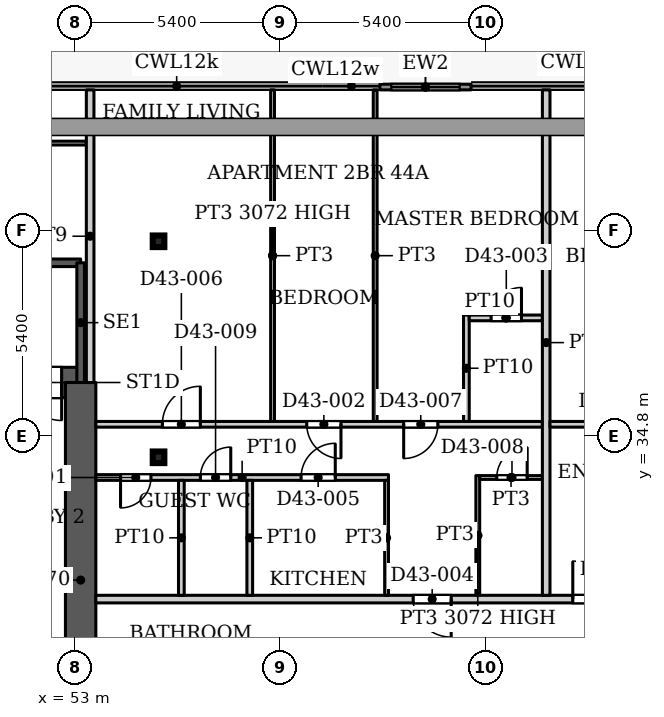
"""IFC4 building model, lengths in metres.
Left out: names, types, materials, properties, quantities, classifications, styles, units other than length and angle.
Written with IfcOpenShell. Run it as: python <this file> out.ifc"""

import sys

from ifc_helpers import new_model, si_unit, direction, frame, frame_2d, origin, origin_2d, place, context, subcontext, project, spatial, rectangle, hollow_rectangle, extrude, source, transform, mapped, element, fill, save


model = new_model("IFC4")
c1 = context("Model", 3, precision=1e-05, world=origin(), true_north=direction((0.0, 1.0)))
c2 = subcontext(c1, "Body", "Model", "MODEL_VIEW")
j1 = project(units=[si_unit("LENGTHUNIT", "METRE"), si_unit("PLANEANGLEUNIT", "RADIAN")], contexts=[c1])
p1 = place(None, origin())
s1 = spatial("IfcSite", under=j1, at=p1, CompositionType="ELEMENT")
p2 = place(p1, origin())
s2 = spatial("IfcBuilding", under=s1, at=p2, CompositionType="ELEMENT")
p3 = place(p2, frame((0.0, 0.0, 187.7)))
s3 = spatial("IfcBuildingStorey", under=s2, at=p3, CompositionType="ELEMENT", Elevation=187.7)
for number, where, z_axis, x_axis in (
    (1, (55.2, 34.232, 0.0), (0.0, 0.0, 1.0), (1.0, 0.0, 0.0)),
    (2, (55.2, 39.916, 0.0), (0.0, 0.0, 1.0), (1.0, 0.0, 0.0)),
):
    element("IfcColumn", number, at=place(p3, frame(where, z_axis=z_axis, x_axis=x_axis)), inside=s3, PredefinedType="COLUMN", context=c2, shape_type="SweptSolid", body=[
        extrude(hollow_rectangle(XDim=0.305, YDim=0.305, WallThickness=0.016, InnerFilletRadius=0.016, OuterFilletRadius=0.032, at=origin_2d()), origin(), (0.0, 0.0, 1.0), 3.9),
    ])
p4 = place(p3, frame((34.75, 36.2, 0.0), z_axis=(0.0, 0.0, 1.0), x_axis=(1.0, 0.0, 0.0)))
e3 = element("IfcWall", 3, at=p4, inside=s3, PredefinedType="SHEAR", context=c2, shape_type="SweptSolid", body=[
    extrude(rectangle(XDim=18.4, YDim=0.8, at=frame_2d((9.2, 0.0))), origin(), (0.0, 0.0, 1.0), 3.9),
])
p5 = place(p4, frame((16.9, 0.0, 0.0)))
e4 = element("IfcOpeningElement", 4, at=p5, cuts=e3, PredefinedType="OPENING", context=c2, shape_type="SweptSolid", body=[
    extrude(rectangle(XDim=1.0, YDim=2.2, at=frame_2d((0.5, 1.1))), frame((0.0, 0.41, 0.0), z_axis=(0.0, -1.0, 0.0), x_axis=(1.0, 0.0, 0.0)), (0.0, 0.0, 1.0), 0.82),
])
p6 = place(p3, frame((53.15, 25.8, 0.0), z_axis=(0.0, 0.0, 1.0), x_axis=(0.0, 1.0, 0.0)))
e5 = element("IfcWall", 5, at=p6, inside=s3, PredefinedType="SHEAR", context=c2, shape_type="SweptSolid", body=[
    extrude(rectangle(XDim=10.4, YDim=0.8, at=frame_2d((5.2, 0.0))), origin(), (0.0, 0.0, 1.0), 3.9),
])
p7 = place(p3, frame((61.024, 43.975, 0.0), z_axis=(0.0, 0.0, 1.0), x_axis=(1.0, 0.0, 0.0)))
e6 = element("IfcWall", 6, at=p7, inside=s3, PredefinedType="SOLIDWALL", context=c2, shape_type="SweptSolid", body=[
    extrude(rectangle(XDim=2.4, YDim=0.15, at=frame_2d((1.2, 0.0))), origin(), (0.0, 0.0, 1.0), 3.75),
])
p8 = place(p7, frame((0.3, 0.0, 0.0)))
e7 = element("IfcOpeningElement", 7, at=p8, cuts=e6, PredefinedType="OPENING", context=c2, shape_type="SweptSolid", body=[
    extrude(rectangle(XDim=1.8, YDim=2.4, at=frame_2d((0.9, 1.2))), frame((0.0, 0.085, 0.0), z_axis=(0.0, -1.0, 0.0), x_axis=(1.0, 0.0, 0.0)), (0.0, 0.0, 1.0), 0.17),
])
p9 = place(p3, frame((43.99, 39.35, 0.0), z_axis=(0.0, 0.0, 1.0), x_axis=(1.0, 0.0, 0.0)))
e8 = element("IfcWall", 8, at=p9, inside=s3, PredefinedType="SHEAR", context=c2, shape_type="SweptSolid", body=[
    extrude(rectangle(XDim=9.16, YDim=0.2, at=frame_2d((4.58, 0.0))), origin(), (0.0, 0.0, 1.0), 3.9),
])
p10 = place(p3, frame((53.15, 36.2, 0.0), z_axis=(0.0, 0.0, 1.0), x_axis=(0.0, 1.0, 0.0)))
e9 = element("IfcWall", 9, at=p10, inside=s3, PredefinedType="SHEAR", context=c2, shape_type="SweptSolid", body=[
    extrude(rectangle(XDim=3.15, YDim=0.2, at=frame_2d((1.575, 0.0))), origin(), (0.0, 0.0, 1.0), 3.9),
])
p11 = place(p3, frame((38.399, 42.5, 0.0), z_axis=(0.0, 0.0, 1.0), x_axis=(1.0, 0.0, 0.0)))
e10 = element("IfcWall", 10, at=p11, inside=s3, PredefinedType="PARTITIONING", context=c2, shape_type="SweptSolid", body=[
    extrude(rectangle(XDim=14.901, YDim=0.1, at=frame_2d((7.451, 0.0))), origin(), (0.0, 0.0, 1.0), 3.6),
])
p12 = place(p11, frame((6.801, 0.0, 0.0)))
e11 = element("IfcOpeningElement", 11, at=p12, cuts=e10, PredefinedType="OPENING", context=c2, shape_type="SweptSolid", body=[
    extrude(rectangle(XDim=1.0, YDim=2.1, at=frame_2d((0.5, 1.05))), frame((0.0, 0.06, 0.0), z_axis=(0.0, -1.0, 0.0), x_axis=(1.0, 0.0, 0.0)), (0.0, 0.0, 1.0), 0.12),
])
p13 = place(p3, frame((53.4, 36.199, 0.0), z_axis=(0.0, 0.0, 1.0), x_axis=(0.0, 1.0, 0.0)))
e12 = element("IfcWall", 12, at=p13, inside=s3, PredefinedType="PARTITIONING", context=c2, shape_type="SweptSolid", body=[
    extrude(rectangle(XDim=7.701, YDim=0.2, at=frame_2d((3.851, 0.0))), origin(), (0.0, 0.0, 1.0), 3.6),
])
p14 = place(p3, frame((53.549, 30.5, 0.0), z_axis=(0.0, 0.0, 1.0), x_axis=(1.0, 0.0, 0.0)))
e13 = element("IfcWall", 13, at=p14, inside=s3, PredefinedType="PARTITIONING", context=c2, shape_type="SweptSolid", body=[
    extrude(rectangle(XDim=44.551, YDim=0.2, at=frame_2d((22.275, 0.0))), origin(), (0.0, 0.0, 1.0), 3.6),
])
p15 = place(p14, frame((8.351, 0.0, 0.0)))
e14 = element("IfcOpeningElement", 14, at=p15, cuts=e13, PredefinedType="OPENING", context=c2, shape_type="SweptSolid", body=[
    extrude(rectangle(XDim=1.0, YDim=2.1, at=frame_2d((0.5, 1.05))), frame((0.0, 0.11, 0.0), z_axis=(0.0, -1.0, 0.0), x_axis=(1.0, 0.0, 0.0)), (0.0, 0.0, 1.0), 0.22),
])
p16 = place(p14, frame((12.551, 0.0, 0.0)))
e15 = element("IfcOpeningElement", 15, at=p16, cuts=e13, PredefinedType="OPENING", context=c2, shape_type="SweptSolid", body=[
    extrude(rectangle(XDim=1.0, YDim=2.1, at=frame_2d((0.5, 1.05))), frame((0.0, 0.11, 0.0), z_axis=(0.0, -1.0, 0.0), x_axis=(1.0, 0.0, 0.0)), (0.0, 0.0, 1.0), 0.22),
])
p17 = place(p14, frame((28.751, 0.0, 0.0)))
e16 = element("IfcOpeningElement", 16, at=p17, cuts=e13, PredefinedType="OPENING", context=c2, shape_type="SweptSolid", body=[
    extrude(rectangle(XDim=1.0, YDim=2.1, at=frame_2d((0.5, 1.05))), frame((0.0, 0.11, 0.0), z_axis=(0.0, -1.0, 0.0), x_axis=(1.0, 0.0, 0.0)), (0.0, 0.0, 1.0), 0.22),
])
p18 = place(p14, frame((40.751, 0.0, 0.0)))
e17 = element("IfcOpeningElement", 17, at=p18, cuts=e13, PredefinedType="OPENING", context=c2, shape_type="SweptSolid", body=[
    extrude(rectangle(XDim=1.0, YDim=2.1, at=frame_2d((0.5, 1.05))), frame((0.0, 0.11, 0.0), z_axis=(0.0, -1.0, 0.0), x_axis=(1.0, 0.0, 0.0)), (0.0, 0.0, 1.0), 0.22),
])
p19 = place(p3, frame((53.549, 33.7, 0.0), z_axis=(0.0, 0.0, 1.0), x_axis=(1.0, 0.0, 0.0)))
e18 = element("IfcWall", 18, at=p19, inside=s3, PredefinedType="PARTITIONING", context=c2, shape_type="SweptSolid", body=[
    extrude(rectangle(XDim=7.701, YDim=0.15, at=frame_2d((3.851, 0.0))), origin(), (0.0, 0.0, 1.0), 3.6),
])
p20 = place(p19, frame((0.651, 0.0, 0.0)))
e19 = element("IfcOpeningElement", 19, at=p20, cuts=e18, PredefinedType="OPENING", context=c2, shape_type="SweptSolid", body=[
    extrude(rectangle(XDim=0.8, YDim=2.1, at=frame_2d((0.4, 1.05))), frame((0.0, 0.085, 0.0), z_axis=(0.0, -1.0, 0.0), x_axis=(1.0, 0.0, 0.0)), (0.0, 0.0, 1.0), 0.17),
])
p21 = place(p19, frame((5.401, 0.0, 0.0)))
e20 = element("IfcOpeningElement", 20, at=p21, cuts=e18, PredefinedType="OPENING", context=c2, shape_type="SweptSolid", body=[
    extrude(rectangle(XDim=0.9, YDim=2.1, at=frame_2d((0.45, 1.05))), frame((0.0, 0.085, 0.0), z_axis=(0.0, -1.0, 0.0), x_axis=(1.0, 0.0, 0.0)), (0.0, 0.0, 1.0), 0.17),
])
p22 = place(p19, frame((2.751, 0.0, 0.0)))
e21 = element("IfcOpeningElement", 21, at=p22, cuts=e18, PredefinedType="OPENING", context=c2, shape_type="SweptSolid", body=[
    extrude(rectangle(XDim=0.8, YDim=2.1, at=frame_2d((0.4, 1.05))), frame((0.0, 0.085, 0.0), z_axis=(0.0, -1.0, 0.0), x_axis=(1.0, 0.0, 0.0)), (0.0, 0.0, 1.0), 0.17),
])
p23 = place(p3, frame((53.549, 35.1, 0.0), z_axis=(0.0, 0.0, 1.0), x_axis=(1.0, 0.0, 0.0)))
e22 = element("IfcWall", 22, at=p23, inside=s3, PredefinedType="PARTITIONING", context=c2, shape_type="SweptSolid", body=[
    extrude(rectangle(XDim=11.751, YDim=0.15, at=frame_2d((5.875, 0.0))), origin(), (0.0, 0.0, 1.0), 3.6),
])
p24 = place(p23, frame((5.551, 0.0, 0.0)))
e23 = element("IfcOpeningElement", 23, at=p24, cuts=e22, PredefinedType="OPENING", context=c2, shape_type="SweptSolid", body=[
    extrude(rectangle(XDim=0.9, YDim=2.1, at=frame_2d((0.45, 1.05))), frame((0.0, 0.085, 0.0), z_axis=(0.0, -1.0, 0.0), x_axis=(1.0, 0.0, 0.0)), (0.0, 0.0, 1.0), 0.17),
])
p25 = place(p23, frame((1.751, 0.0, 0.0)))
e24 = element("IfcOpeningElement", 24, at=p25, cuts=e22, PredefinedType="OPENING", context=c2, shape_type="SweptSolid", body=[
    extrude(rectangle(XDim=1.0, YDim=2.1, at=frame_2d((0.5, 1.05))), frame((0.0, 0.085, 0.0), z_axis=(0.0, -1.0, 0.0), x_axis=(1.0, 0.0, 0.0)), (0.0, 0.0, 1.0), 0.17),
])
p26 = place(p23, frame((8.101, 0.0, 0.0)))
e25 = element("IfcOpeningElement", 25, at=p26, cuts=e22, PredefinedType="OPENING", context=c2, shape_type="SweptSolid", body=[
    extrude(rectangle(XDim=0.9, YDim=2.1, at=frame_2d((0.45, 1.05))), frame((0.0, 0.085, 0.0), z_axis=(0.0, -1.0, 0.0), x_axis=(1.0, 0.0, 0.0)), (0.0, 0.0, 1.0), 0.17),
])
for number, where, z_axis, x_axis in (
    (26, (55.8, 30.6, 0.0), (0.0, 0.0, 1.0), (0.0, 1.0, 0.0)),
    (27, (57.6, 30.6, 0.0), (0.0, 0.0, 1.0), (0.0, 1.0, 0.0)),
):
    element("IfcWall", number, at=place(p3, frame(where, z_axis=z_axis, x_axis=x_axis)), inside=s3, PredefinedType="PARTITIONING", context=c2, shape_type="SweptSolid", body=[
        extrude(rectangle(XDim=3.025, YDim=0.15, at=frame_2d((1.512, 0.0))), origin(), (0.0, 0.0, 1.0), 3.6),
    ])
p27 = place(p3, frame((58.2, 35.175, 0.0), z_axis=(0.0, 0.0, 1.0), x_axis=(0.0, 1.0, 0.0)))
e28 = element("IfcWall", 28, at=p27, inside=s3, PredefinedType="PARTITIONING", context=c2, shape_type="SweptSolid", body=[
    extrude(rectangle(XDim=8.725, YDim=0.1, at=frame_2d((4.362, 0.0))), origin(), (0.0, 0.0, 1.0), 3.072),
])
p28 = place(p3, frame((60.9, 35.175, 0.0), z_axis=(0.0, 0.0, 1.0), x_axis=(0.0, 1.0, 0.0)))
e29 = element("IfcWall", 29, at=p28, inside=s3, PredefinedType="PARTITIONING", context=c2, shape_type="SweptSolid", body=[
    extrude(rectangle(XDim=8.725, YDim=0.1, at=frame_2d((4.362, 0.0))), origin(), (0.0, 0.0, 1.0), 3.6),
])
p29 = place(p3, frame((61.2, 30.6, 0.0), z_axis=(0.0, 0.0, 1.0), x_axis=(0.0, 1.0, 0.0)))
e30 = element("IfcWall", 30, at=p29, inside=s3, PredefinedType="PARTITIONING", context=c2, shape_type="SweptSolid", body=[
    extrude(rectangle(XDim=3.025, YDim=0.1, at=frame_2d((1.512, 0.0))), origin(), (0.0, 0.0, 1.0), 3.6),
])
p30 = place(p3, frame((63.3, 35.175, 0.0), z_axis=(0.0, 0.0, 1.0), x_axis=(0.0, 1.0, 0.0)))
e31 = element("IfcWall", 31, at=p30, inside=s3, PredefinedType="PARTITIONING", context=c2, shape_type="SweptSolid", body=[
    extrude(rectangle(XDim=2.8, YDim=0.15, at=frame_2d((1.4, 0.0))), origin(), (0.0, 0.0, 1.0), 3.6),
])
p31 = place(p3, frame((63.375, 37.9, 0.0), z_axis=(0.0, 0.0, 1.0), x_axis=(1.0, 0.0, 0.0)))
e32 = element("IfcWall", 32, at=p31, inside=s3, PredefinedType="PARTITIONING", context=c2, shape_type="SweptSolid", body=[
    extrude(rectangle(XDim=1.925, YDim=0.15, at=frame_2d((0.962, 0.0))), origin(), (0.0, 0.0, 1.0), 3.6),
])
p32 = place(p31, frame((0.575, 0.0, 0.0)))
e33 = element("IfcOpeningElement", 33, at=p32, cuts=e32, PredefinedType="OPENING", context=c2, shape_type="SweptSolid", body=[
    extrude(rectangle(XDim=0.8, YDim=2.1, at=frame_2d((0.4, 1.05))), frame((0.0, 0.085, 0.0), z_axis=(0.0, -1.0, 0.0), x_axis=(1.0, 0.0, 0.0)), (0.0, 0.0, 1.0), 0.17),
])
p33 = place(p3, frame((63.6, 30.6, 0.0), z_axis=(0.0, 0.0, 1.0), x_axis=(0.0, 1.0, 0.0)))
e34 = element("IfcWall", 34, at=p33, inside=s3, PredefinedType="PARTITIONING", context=c2, shape_type="SweptSolid", body=[
    extrude(rectangle(XDim=3.15, YDim=0.1, at=frame_2d((1.575, 0.0))), origin(), (0.0, 0.0, 1.0), 3.072),
])
p34 = place(p3, frame((63.65, 33.7, 0.0), z_axis=(0.0, 0.0, 1.0), x_axis=(1.0, 0.0, 0.0)))
e35 = element("IfcWall", 35, at=p34, inside=s3, PredefinedType="PARTITIONING", context=c2, shape_type="SweptSolid", body=[
    extrude(rectangle(XDim=1.65, YDim=0.1, at=frame_2d((0.825, 0.0))), origin(), (0.0, 0.0, 1.0), 3.6),
])
p35 = place(p34, frame((0.45, 0.0, 0.0)))
e36 = element("IfcOpeningElement", 36, at=p35, cuts=e35, PredefinedType="OPENING", context=c2, shape_type="SweptSolid", body=[
    extrude(rectangle(XDim=0.8, YDim=2.1, at=frame_2d((0.4, 1.05))), frame((0.0, 0.06, 0.0), z_axis=(0.0, -1.0, 0.0), x_axis=(1.0, 0.0, 0.0)), (0.0, 0.0, 1.0), 0.12),
])
p36 = place(p3, frame((65.4, 30.6, 0.0), z_axis=(0.0, 0.0, 1.0), x_axis=(0.0, 1.0, 0.0)))
e37 = element("IfcWall", 37, at=p36, inside=s3, PredefinedType="PARTITIONING", context=c2, shape_type="SweptSolid", body=[
    extrude(rectangle(XDim=13.3, YDim=0.2, at=frame_2d((6.65, 0.0))), origin(), (0.0, 0.0, 1.0), 3.6),
])
p37 = place(p3, frame((65.5, 35.1, 0.0), z_axis=(0.0, 0.0, 1.0), x_axis=(1.0, 0.0, 0.0)))
e38 = element("IfcWall", 38, at=p37, inside=s3, PredefinedType="PARTITIONING", context=c2, shape_type="SweptSolid", body=[
    extrude(rectangle(XDim=13.3, YDim=0.15, at=frame_2d((6.65, 0.0))), origin(), (0.0, 0.0, 1.0), 3.6),
])
p38 = place(p37, frame((1.4, 0.0, 0.0)))
e39 = element("IfcOpeningElement", 39, at=p38, cuts=e38, PredefinedType="OPENING", context=c2, shape_type="SweptSolid", body=[
    extrude(rectangle(XDim=0.9, YDim=2.1, at=frame_2d((0.45, 1.05))), frame((0.0, 0.085, 0.0), z_axis=(0.0, -1.0, 0.0), x_axis=(1.0, 0.0, 0.0)), (0.0, 0.0, 1.0), 0.17),
])
p39 = place(p37, frame((10.5, 0.0, 0.0)))
e40 = element("IfcOpeningElement", 40, at=p39, cuts=e38, PredefinedType="OPENING", context=c2, shape_type="SweptSolid", body=[
    extrude(rectangle(XDim=1.0, YDim=2.1, at=frame_2d((0.5, 1.05))), frame((0.0, 0.085, 0.0), z_axis=(0.0, -1.0, 0.0), x_axis=(1.0, 0.0, 0.0)), (0.0, 0.0, 1.0), 0.17),
])
p40 = place(p37, frame((6.8, 0.0, 0.0)))
e41 = element("IfcOpeningElement", 41, at=p40, cuts=e38, PredefinedType="OPENING", context=c2, shape_type="SweptSolid", body=[
    extrude(rectangle(XDim=0.9, YDim=2.1, at=frame_2d((0.45, 1.05))), frame((0.0, 0.085, 0.0), z_axis=(0.0, -1.0, 0.0), x_axis=(1.0, 0.0, 0.0)), (0.0, 0.0, 1.0), 0.17),
])
m1 = source(origin(), c2, "Body", "SweptSolid", [
    extrude(rectangle(XDim=1.8, YDim=2.4, at=frame_2d((0.9, 1.2))), frame((0.0, 0.025, 0.0), z_axis=(0.0, -1.0, 0.0), x_axis=(1.0, 0.0, 0.0)), (0.0, 0.0, 1.0), 0.05),
])
p41 = place(p8, origin())
e42 = element("IfcDoor", 42, at=p41, inside=s3, OperationType="SLIDING_TO_LEFT", PredefinedType="DOOR", context=c2, shape_type="MappedRepresentation", body=[
    mapped(m1, transform((0.0, 0.0, 0.0), x_axis=(1.0, 0.0, 0.0), y_axis=(0.0, 1.0, 0.0), z_axis=(0.0, 0.0, 1.0), scale=1.0)),
])
fill(e7, e42)
m2 = source(origin(), c2, "Body", "SweptSolid", [
    extrude(rectangle(XDim=1.0, YDim=2.2, at=frame_2d((0.5, 1.1))), frame((0.0, 0.025, 0.0), z_axis=(0.0, -1.0, 0.0), x_axis=(1.0, 0.0, 0.0)), (0.0, 0.0, 1.0), 0.05),
])
p42 = place(p5, origin())
e43 = element("IfcDoor", 43, at=p42, inside=s3, OperationType="SINGLE_SWING_RIGHT", PredefinedType="DOOR", context=c2, shape_type="MappedRepresentation", body=[
    mapped(m2, transform((0.0, 0.0, 0.0), x_axis=(1.0, 0.0, 0.0), y_axis=(0.0, 1.0, 0.0), z_axis=(0.0, 0.0, 1.0), scale=1.0)),
])
fill(e4, e43)
m3 = source(origin(), c2, "Body", "SweptSolid", [
    extrude(rectangle(XDim=0.8, YDim=2.1, at=frame_2d((0.4, 1.05))), frame((0.0, 0.025, 0.0), z_axis=(0.0, -1.0, 0.0), x_axis=(1.0, 0.0, 0.0)), (0.0, 0.0, 1.0), 0.05),
])
p43 = place(p20, origin())
e44 = element("IfcDoor", 44, at=p43, inside=s3, OperationType="SINGLE_SWING_RIGHT", PredefinedType="DOOR", context=c2, shape_type="MappedRepresentation", body=[
    mapped(m3, transform((0.0, 0.0, 0.0), x_axis=(1.0, 0.0, 0.0), y_axis=(0.0, 1.0, 0.0), z_axis=(0.0, 0.0, 1.0), scale=1.0)),
])
fill(e19, e44)
m4 = source(origin(), c2, "Body", "SweptSolid", [
    extrude(rectangle(XDim=0.9, YDim=2.1, at=frame_2d((0.45, 1.05))), frame((0.0, 0.025, 0.0), z_axis=(0.0, -1.0, 0.0), x_axis=(1.0, 0.0, 0.0)), (0.0, 0.0, 1.0), 0.05),
])
p44 = place(p24, origin())
e45 = element("IfcDoor", 45, at=p44, inside=s3, OperationType="SINGLE_SWING_RIGHT", PredefinedType="DOOR", context=c2, shape_type="MappedRepresentation", body=[
    mapped(m4, transform((0.0, 0.0, 0.0), x_axis=(1.0, 0.0, 0.0), y_axis=(0.0, 1.0, 0.0), z_axis=(0.0, 0.0, 1.0), scale=1.0)),
])
fill(e23, e45)
p45 = place(p32, origin())
e46 = element("IfcDoor", 46, at=p45, inside=s3, OperationType="SINGLE_SWING_LEFT", PredefinedType="DOOR", context=c2, shape_type="MappedRepresentation", body=[
    mapped(m3, transform((0.0, 0.0, 0.0), x_axis=(1.0, 0.0, 0.0), y_axis=(0.0, 1.0, 0.0), z_axis=(0.0, 0.0, 1.0), scale=1.0)),
])
fill(e33, e46)
m5 = source(origin(), c2, "Body", "SweptSolid", [
    extrude(rectangle(XDim=1.0, YDim=2.1, at=frame_2d((0.5, 1.05))), frame((0.0, 0.025, 0.0), z_axis=(0.0, -1.0, 0.0), x_axis=(1.0, 0.0, 0.0)), (0.0, 0.0, 1.0), 0.05),
])
p46 = place(p15, origin())
e47 = element("IfcDoor", 47, at=p46, inside=s3, OperationType="SINGLE_SWING_RIGHT", PredefinedType="DOOR", context=c2, shape_type="MappedRepresentation", body=[
    mapped(m5, transform((0.0, 0.0, 0.0), x_axis=(1.0, 0.0, 0.0), y_axis=(0.0, 1.0, 0.0), z_axis=(0.0, 0.0, 1.0), scale=1.0)),
])
fill(e14, e47)
p47 = place(p21, origin())
e48 = element("IfcDoor", 48, at=p47, inside=s3, OperationType="SINGLE_SWING_LEFT", PredefinedType="DOOR", context=c2, shape_type="MappedRepresentation", body=[
    mapped(m4, transform((0.0, 0.0, 0.0), x_axis=(1.0, 0.0, 0.0), y_axis=(0.0, 1.0, 0.0), z_axis=(0.0, 0.0, 1.0), scale=1.0)),
])
fill(e20, e48)
m6 = source(origin(), c2, "Body", "SweptSolid", [
    extrude(rectangle(XDim=1.0, YDim=2.1, at=frame_2d((0.5, 1.05))), frame((0.0, 0.025, 0.0), z_axis=(0.0, -1.0, 0.0), x_axis=(1.0, 0.0, 0.0)), (0.0, 0.0, 1.0), 0.05),
])
p48 = place(p25, origin())
e49 = element("IfcDoor", 49, at=p48, inside=s3, OperationType="SINGLE_SWING_LEFT", PredefinedType="DOOR", context=c2, shape_type="MappedRepresentation", body=[
    mapped(m6, transform((0.0, 0.0, 0.0), x_axis=(1.0, 0.0, 0.0), y_axis=(0.0, 1.0, 0.0), z_axis=(0.0, 0.0, 1.0), scale=1.0)),
])
fill(e24, e49)
p49 = place(p26, origin())
e50 = element("IfcDoor", 50, at=p49, inside=s3, OperationType="SINGLE_SWING_RIGHT", PredefinedType="DOOR", context=c2, shape_type="MappedRepresentation", body=[
    mapped(m4, transform((0.0, 0.0, 0.0), x_axis=(1.0, 0.0, 0.0), y_axis=(0.0, 1.0, 0.0), z_axis=(0.0, 0.0, 1.0), scale=1.0)),
])
fill(e25, e50)
p50 = place(p35, origin())
e51 = element("IfcDoor", 51, at=p50, inside=s3, OperationType="SINGLE_SWING_LEFT", PredefinedType="DOOR", context=c2, shape_type="MappedRepresentation", body=[
    mapped(m3, transform((0.0, 0.0, 0.0), x_axis=(1.0, 0.0, 0.0), y_axis=(0.0, 1.0, 0.0), z_axis=(0.0, 0.0, 1.0), scale=1.0)),
])
fill(e36, e51)
p51 = place(p22, origin())
e52 = element("IfcDoor", 52, at=p51, inside=s3, OperationType="SINGLE_SWING_LEFT", PredefinedType="DOOR", context=c2, shape_type="MappedRepresentation", body=[
    mapped(m3, transform((0.0, 0.0, 0.0), x_axis=(1.0, 0.0, 0.0), y_axis=(0.0, 1.0, 0.0), z_axis=(0.0, 0.0, 1.0), scale=1.0)),
])
fill(e21, e52)
p52 = place(p16, origin())
e53 = element("IfcDoor", 53, at=p52, inside=s3, OperationType="SINGLE_SWING_LEFT", PredefinedType="DOOR", context=c2, shape_type="MappedRepresentation", body=[
    mapped(m5, transform((0.0, 0.0, 0.0), x_axis=(1.0, 0.0, 0.0), y_axis=(0.0, 1.0, 0.0), z_axis=(0.0, 0.0, 1.0), scale=1.0)),
])
fill(e15, e53)
save(model, sys.argv[1])
